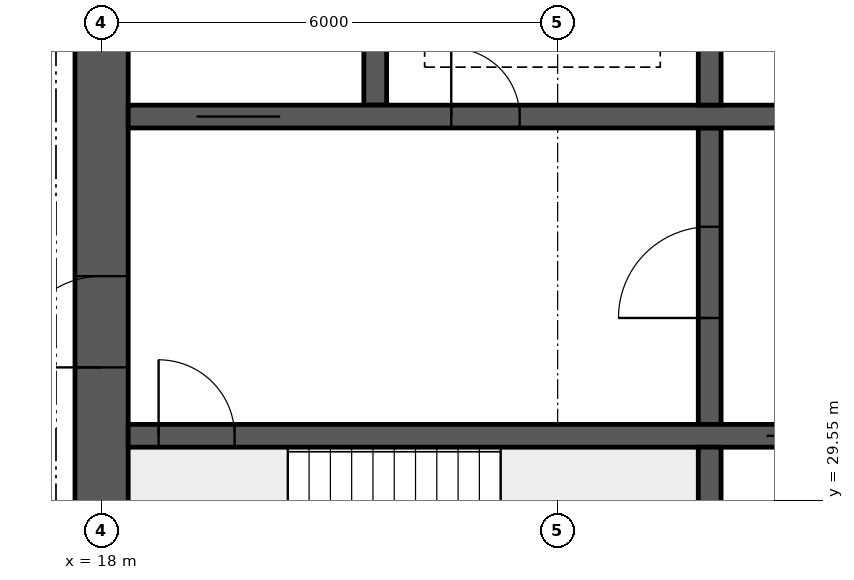
"""IFC4 building model, lengths in metres.
Left out: names, types, materials, properties, quantities, classifications, styles, units other than length and angle.
Written with IfcOpenShell. Run it as: python <this file> out.ifc"""

import sys

from ifc_helpers import new_model, si_unit, direction, frame, frame_2d, origin, place, context, subcontext, project, spatial, rectangle, extrude, element, fill, save


model = new_model("IFC4")
c1 = context("Model", 3, precision=1e-05, world=origin(), true_north=direction((0.0, 1.0)))
c2 = subcontext(c1, "Body", "Model", "MODEL_VIEW")
j1 = project(units=[si_unit("LENGTHUNIT", "METRE"), si_unit("PLANEANGLEUNIT", "RADIAN")], contexts=[c1])
p1 = place(None, origin())
s1 = spatial("IfcSite", under=j1, at=p1, CompositionType="ELEMENT")
p2 = place(p1, origin())
s2 = spatial("IfcBuilding", under=s1, at=p2, CompositionType="ELEMENT")
p3 = place(p2, frame((0.0, 0.0, 246.55)))
s3 = spatial("IfcBuildingStorey", under=s2, at=p3, CompositionType="ELEMENT", Elevation=246.55)
p4 = place(p3, frame((18.0, 26.15, 0.0), z_axis=(0.0, 0.0, 1.0), x_axis=(0.0, 1.0, 0.0)))
e1 = element("IfcWall", 1, at=p4, inside=s3, PredefinedType="SHEAR", context=c2, shape_type="SweptSolid", body=[
    extrude(rectangle(XDim=11.7, YDim=0.7, at=frame_2d((5.85, 0.0))), origin(), (0.0, 0.0, 1.0), 3.75),
])
p5 = place(p4, frame((5.15, 0.0, 0.0)))
e2 = element("IfcOpeningElement", 2, at=p5, cuts=e1, PredefinedType="OPENING", context=c2, shape_type="SweptSolid", body=[
    extrude(rectangle(XDim=1.2, YDim=2.1, at=frame_2d((0.6, 1.05))), frame((0.0, 0.36, 0.0), z_axis=(0.0, -1.0, 0.0), x_axis=(1.0, 0.0, 0.0)), (0.0, 0.0, 1.0), 0.72),
])
p6 = place(p3, frame((18.35, 30.4, 0.0), z_axis=(0.0, 0.0, 1.0), x_axis=(1.0, 0.0, 0.0)))
e3 = element("IfcWall", 3, at=p6, inside=s3, PredefinedType="SHEAR", context=c2, shape_type="SweptSolid", body=[
    extrude(rectangle(XDim=47.3, YDim=0.3, at=frame_2d((23.65, 0.0))), origin(), (0.0, 0.0, 1.0), 3.75),
])
p7 = place(p6, frame((0.4, 0.0, 0.0)))
e4 = element("IfcOpeningElement", 4, at=p7, cuts=e3, PredefinedType="OPENING", context=c2, shape_type="SweptSolid", body=[
    extrude(rectangle(XDim=1.0, YDim=2.1, at=frame_2d((0.5, 1.05))), frame((0.0, 0.16, 0.0), z_axis=(0.0, -1.0, 0.0), x_axis=(1.0, 0.0, 0.0)), (0.0, 0.0, 1.0), 0.32),
])
p8 = place(p6, frame((45.9, 0.0, 0.0)))
e5 = element("IfcOpeningElement", 5, at=p8, cuts=e3, PredefinedType="OPENING", context=c2, shape_type="SweptSolid", body=[
    extrude(rectangle(XDim=1.0, YDim=2.1, at=frame_2d((0.5, 1.05))), frame((0.0, 0.16, 0.0), z_axis=(0.0, -1.0, 0.0), x_axis=(1.0, 0.0, 0.0)), (0.0, 0.0, 1.0), 0.32),
])
p9 = place(p6, frame((8.4, 0.0, 0.0)))
e6 = element("IfcOpeningElement", 6, at=p9, cuts=e3, PredefinedType="OPENING", context=c2, shape_type="SweptSolid", body=[
    extrude(rectangle(XDim=1.1, YDim=2.1, at=frame_2d((0.55, 1.05))), frame((0.0, 0.16, 0.0), z_axis=(0.0, -1.0, 0.0), x_axis=(1.0, 0.0, 0.0)), (0.0, 0.0, 1.0), 0.32),
])
p10 = place(p6, frame((11.0, 0.0, 0.0)))
e7 = element("IfcOpeningElement", 7, at=p10, cuts=e3, PredefinedType="OPENING", context=c2, shape_type="SweptSolid", body=[
    extrude(rectangle(XDim=1.1, YDim=2.1, at=frame_2d((0.55, 1.05))), frame((0.0, 0.16, 0.0), z_axis=(0.0, -1.0, 0.0), x_axis=(1.0, 0.0, 0.0)), (0.0, 0.0, 1.0), 0.32),
])
p11 = place(p6, frame((13.6, 0.0, 0.0)))
e8 = element("IfcOpeningElement", 8, at=p11, cuts=e3, PredefinedType="OPENING", context=c2, shape_type="SweptSolid", body=[
    extrude(rectangle(XDim=1.1, YDim=2.1, at=frame_2d((0.55, 1.05))), frame((0.0, 0.16, 0.0), z_axis=(0.0, -1.0, 0.0), x_axis=(1.0, 0.0, 0.0)), (0.0, 0.0, 1.0), 0.32),
])
p12 = place(p6, frame((16.2, 0.0, 0.0)))
e9 = element("IfcOpeningElement", 9, at=p12, cuts=e3, PredefinedType="OPENING", context=c2, shape_type="SweptSolid", body=[
    extrude(rectangle(XDim=1.1, YDim=2.1, at=frame_2d((0.55, 1.05))), frame((0.0, 0.16, 0.0), z_axis=(0.0, -1.0, 0.0), x_axis=(1.0, 0.0, 0.0)), (0.0, 0.0, 1.0), 0.32),
])
p13 = place(p6, frame((18.975, 0.0, 0.0)))
e10 = element("IfcOpeningElement", 10, at=p13, cuts=e3, PredefinedType="OPENING", context=c2, shape_type="SweptSolid", body=[
    extrude(rectangle(XDim=0.9, YDim=2.1, at=frame_2d((0.45, 1.05))), frame((0.0, 0.16, 0.0), z_axis=(0.0, -1.0, 0.0), x_axis=(1.0, 0.0, 0.0)), (0.0, 0.0, 1.0), 0.32),
])
p14 = place(p6, frame((24.475, 0.0, 0.0)))
e11 = element("IfcOpeningElement", 11, at=p14, cuts=e3, PredefinedType="OPENING", context=c2, shape_type="SweptSolid", body=[
    extrude(rectangle(XDim=0.9, YDim=2.1, at=frame_2d((0.45, 1.05))), frame((0.0, 0.16, 0.0), z_axis=(0.0, -1.0, 0.0), x_axis=(1.0, 0.0, 0.0)), (0.0, 0.0, 1.0), 0.32),
])
p15 = place(p6, frame((30.267, 0.0, 0.0)))
e12 = element("IfcOpeningElement", 12, at=p15, cuts=e3, PredefinedType="OPENING", context=c2, shape_type="SweptSolid", body=[
    extrude(rectangle(XDim=1.1, YDim=2.1, at=frame_2d((0.55, 1.05))), frame((0.0, 0.16, 0.0), z_axis=(0.0, -1.0, 0.0), x_axis=(1.0, 0.0, 0.0)), (0.0, 0.0, 1.0), 0.32),
])
p16 = place(p6, frame((33.8, 0.0, 0.0)))
e13 = element("IfcOpeningElement", 13, at=p16, cuts=e3, PredefinedType="OPENING", context=c2, shape_type="SweptSolid", body=[
    extrude(rectangle(XDim=1.1, YDim=2.1, at=frame_2d((0.55, 1.05))), frame((0.0, 0.16, 0.0), z_axis=(0.0, -1.0, 0.0), x_axis=(1.0, 0.0, 0.0)), (0.0, 0.0, 1.0), 0.32),
])
p17 = place(p6, frame((37.333, 0.0, 0.0)))
e14 = element("IfcOpeningElement", 14, at=p17, cuts=e3, PredefinedType="OPENING", context=c2, shape_type="SweptSolid", body=[
    extrude(rectangle(XDim=1.1, YDim=2.1, at=frame_2d((0.55, 1.05))), frame((0.0, 0.16, 0.0), z_axis=(0.0, -1.0, 0.0), x_axis=(1.0, 0.0, 0.0)), (0.0, 0.0, 1.0), 0.32),
])
p18 = place(p3, frame((18.35, 34.6, 0.0), z_axis=(0.0, 0.0, 1.0), x_axis=(1.0, 0.0, 0.0)))
e15 = element("IfcWall", 15, at=p18, inside=s3, PredefinedType="SHEAR", context=c2, shape_type="SweptSolid", body=[
    extrude(rectangle(XDim=47.3, YDim=0.3, at=frame_2d((23.65, 0.0))), origin(), (0.0, 0.0, 1.0), 3.75),
])
p19 = place(p18, frame((0.9, 0.0, 0.0)))
e16 = element("IfcOpeningElement", 16, at=p19, cuts=e15, PredefinedType="OPENING", context=c2, shape_type="SweptSolid", body=[
    extrude(rectangle(XDim=1.1, YDim=2.1, at=frame_2d((0.55, 1.05))), frame((0.0, 0.16, 0.0), z_axis=(0.0, -1.0, 0.0), x_axis=(1.0, 0.0, 0.0)), (0.0, 0.0, 1.0), 0.32),
])
p20 = place(p18, frame((45.3, 0.0, 0.0)))
e17 = element("IfcOpeningElement", 17, at=p20, cuts=e15, PredefinedType="OPENING", context=c2, shape_type="SweptSolid", body=[
    extrude(rectangle(XDim=1.1, YDim=2.1, at=frame_2d((0.55, 1.05))), frame((0.0, 0.16, 0.0), z_axis=(0.0, -1.0, 0.0), x_axis=(1.0, 0.0, 0.0)), (0.0, 0.0, 1.0), 0.32),
])
p21 = place(p18, frame((4.25, 0.0, 0.0)))
e18 = element("IfcOpeningElement", 18, at=p21, cuts=e15, PredefinedType="OPENING", context=c2, shape_type="SweptSolid", body=[
    extrude(rectangle(XDim=0.9, YDim=2.1, at=frame_2d((0.45, 1.05))), frame((0.0, 0.16, 0.0), z_axis=(0.0, -1.0, 0.0), x_axis=(1.0, 0.0, 0.0)), (0.0, 0.0, 1.0), 0.32),
])
p22 = place(p18, frame((42.15, 0.0, 0.0)))
e19 = element("IfcOpeningElement", 19, at=p22, cuts=e15, PredefinedType="OPENING", context=c2, shape_type="SweptSolid", body=[
    extrude(rectangle(XDim=0.9, YDim=2.1, at=frame_2d((0.45, 1.05))), frame((0.0, 0.16, 0.0), z_axis=(0.0, -1.0, 0.0), x_axis=(1.0, 0.0, 0.0)), (0.0, 0.0, 1.0), 0.32),
])
p23 = place(p18, frame((9.025, 0.0, 0.0)))
e20 = element("IfcOpeningElement", 20, at=p23, cuts=e15, PredefinedType="OPENING", context=c2, shape_type="SweptSolid", body=[
    extrude(rectangle(XDim=0.9, YDim=2.1, at=frame_2d((0.45, 1.05))), frame((0.0, 0.16, 0.0), z_axis=(0.0, -1.0, 0.0), x_axis=(1.0, 0.0, 0.0)), (0.0, 0.0, 1.0), 0.32),
])
p24 = place(p18, frame((12.999, 0.0, 0.0)))
e21 = element("IfcOpeningElement", 21, at=p24, cuts=e15, PredefinedType="OPENING", context=c2, shape_type="SweptSolid", body=[
    extrude(rectangle(XDim=0.9, YDim=2.1, at=frame_2d((0.45, 1.05))), frame((0.0, 0.16, 0.0), z_axis=(0.0, -1.0, 0.0), x_axis=(1.0, 0.0, 0.0)), (0.0, 0.0, 1.0), 0.32),
])
p25 = place(p18, frame((16.646, 0.0, 0.0)))
e22 = element("IfcOpeningElement", 22, at=p25, cuts=e15, PredefinedType="OPENING", context=c2, shape_type="SweptSolid", body=[
    extrude(rectangle(XDim=0.9, YDim=2.1, at=frame_2d((0.45, 1.05))), frame((0.0, 0.16, 0.0), z_axis=(0.0, -1.0, 0.0), x_axis=(1.0, 0.0, 0.0)), (0.0, 0.0, 1.0), 0.32),
])
p26 = place(p18, frame((20.405, 0.0, 0.0)))
e23 = element("IfcOpeningElement", 23, at=p26, cuts=e15, PredefinedType="OPENING", context=c2, shape_type="SweptSolid", body=[
    extrude(rectangle(XDim=0.9, YDim=2.1, at=frame_2d((0.45, 1.05))), frame((0.0, 0.16, 0.0), z_axis=(0.0, -1.0, 0.0), x_axis=(1.0, 0.0, 0.0)), (0.0, 0.0, 1.0), 0.32),
])
p27 = place(p18, frame((24.811, 0.0, 0.0)))
e24 = element("IfcOpeningElement", 24, at=p27, cuts=e15, PredefinedType="OPENING", context=c2, shape_type="SweptSolid", body=[
    extrude(rectangle(XDim=0.9, YDim=2.1, at=frame_2d((0.45, 1.05))), frame((0.0, 0.16, 0.0), z_axis=(0.0, -1.0, 0.0), x_axis=(1.0, 0.0, 0.0)), (0.0, 0.0, 1.0), 0.32),
])
p28 = place(p18, frame((27.608, 0.0, 0.0)))
e25 = element("IfcOpeningElement", 25, at=p28, cuts=e15, PredefinedType="OPENING", context=c2, shape_type="SweptSolid", body=[
    extrude(rectangle(XDim=0.9, YDim=2.1, at=frame_2d((0.45, 1.05))), frame((0.0, 0.16, 0.0), z_axis=(0.0, -1.0, 0.0), x_axis=(1.0, 0.0, 0.0)), (0.0, 0.0, 1.0), 0.32),
])
p29 = place(p18, frame((29.778, 0.0, 0.0)))
e26 = element("IfcOpeningElement", 26, at=p29, cuts=e15, PredefinedType="OPENING", context=c2, shape_type="SweptSolid", body=[
    extrude(rectangle(XDim=0.9, YDim=2.1, at=frame_2d((0.45, 1.05))), frame((0.0, 0.16, 0.0), z_axis=(0.0, -1.0, 0.0), x_axis=(1.0, 0.0, 0.0)), (0.0, 0.0, 1.0), 0.32),
])
p30 = place(p18, frame((33.577, 0.0, 0.0)))
e27 = element("IfcOpeningElement", 27, at=p30, cuts=e15, PredefinedType="OPENING", context=c2, shape_type="SweptSolid", body=[
    extrude(rectangle(XDim=0.9, YDim=2.1, at=frame_2d((0.45, 1.05))), frame((0.0, 0.16, 0.0), z_axis=(0.0, -1.0, 0.0), x_axis=(1.0, 0.0, 0.0)), (0.0, 0.0, 1.0), 0.32),
])
p31 = place(p18, frame((37.528, 0.0, 0.0)))
e28 = element("IfcOpeningElement", 28, at=p31, cuts=e15, PredefinedType="OPENING", context=c2, shape_type="SweptSolid", body=[
    extrude(rectangle(XDim=0.9, YDim=2.1, at=frame_2d((0.45, 1.05))), frame((0.0, 0.16, 0.0), z_axis=(0.0, -1.0, 0.0), x_axis=(1.0, 0.0, 0.0)), (0.0, 0.0, 1.0), 0.32),
])
p32 = place(p3, frame((26.0, 26.15, 0.0), z_axis=(0.0, 0.0, 1.0), x_axis=(0.0, 1.0, 0.0)))
e29 = element("IfcWall", 29, at=p32, inside=s3, PredefinedType="SHEAR", context=c2, shape_type="SweptSolid", body=[
    extrude(rectangle(XDim=4.1, YDim=0.3, at=frame_2d((2.05, 0.0))), origin(), (0.0, 0.0, 1.0), 3.75),
])
p33 = place(p3, frame((26.0, 30.55, 0.0), z_axis=(0.0, 0.0, 1.0), x_axis=(0.0, 1.0, 0.0)))
e30 = element("IfcWall", 30, at=p33, inside=s3, PredefinedType="SHEAR", context=c2, shape_type="SweptSolid", body=[
    extrude(rectangle(XDim=3.9, YDim=0.3, at=frame_2d((1.95, 0.0))), origin(), (0.0, 0.0, 1.0), 3.75),
])
p34 = place(p33, frame((1.4, 0.0, 0.0)))
e31 = element("IfcOpeningElement", 31, at=p34, cuts=e30, PredefinedType="OPENING", context=c2, shape_type="SweptSolid", body=[
    extrude(rectangle(XDim=1.2, YDim=2.1, at=frame_2d((0.6, 1.05))), frame((0.0, 0.16, 0.0), z_axis=(0.0, -1.0, 0.0), x_axis=(1.0, 0.0, 0.0)), (0.0, 0.0, 1.0), 0.32),
])
for number, where, z_axis, x_axis in (
    (32, (21.6, 34.75, 0.0), (0.0, 0.0, 1.0), (0.0, 1.0, 0.0)),
    (33, (26.0, 34.75, 0.0), (0.0, 0.0, 1.0), (0.0, 1.0, 0.0)),
):
    element("IfcWall", number, at=place(p3, frame(where, z_axis=z_axis, x_axis=x_axis)), inside=s3, PredefinedType="SHEAR", context=c2, shape_type="SweptSolid", body=[
        extrude(rectangle(XDim=3.1, YDim=0.3, at=frame_2d((1.55, 0.0))), origin(), (0.0, 0.0, 1.0), 3.75),
    ])
p35 = place(p5, origin())
e34 = element("IfcDoor", 34, at=p35, inside=s3, OperationType="SINGLE_SWING_LEFT", PredefinedType="DOOR", context=c2, shape_type="SweptSolid", body=[
    extrude(rectangle(XDim=1.2, YDim=2.1, at=frame_2d((0.6, 1.05))), frame((0.0, 0.025, 0.0), z_axis=(0.0, -1.0, 0.0), x_axis=(1.0, 0.0, 0.0)), (0.0, 0.0, 1.0), 0.05),
])
fill(e2, e34)
p36 = place(p7, origin())
e35 = element("IfcDoor", 35, at=p36, inside=s3, OperationType="SINGLE_SWING_LEFT", PredefinedType="DOOR", context=c2, shape_type="SweptSolid", body=[
    extrude(rectangle(XDim=1.0, YDim=2.1, at=frame_2d((0.5, 1.05))), frame((0.0, 0.025, 0.0), z_axis=(0.0, -1.0, 0.0), x_axis=(1.0, 0.0, 0.0)), (0.0, 0.0, 1.0), 0.05),
])
fill(e4, e35)
p37 = place(p19, origin())
e36 = element("IfcDoor", 36, at=p37, inside=s3, OperationType="DOUBLE_DOOR_SLIDING", PredefinedType="DOOR", context=c2, shape_type="SweptSolid", body=[
    extrude(rectangle(XDim=1.1, YDim=2.1, at=frame_2d((0.55, 1.05))), frame((0.0, 0.025, 0.0), z_axis=(0.0, -1.0, 0.0), x_axis=(1.0, 0.0, 0.0)), (0.0, 0.0, 1.0), 0.05),
])
fill(e16, e36)
p38 = place(p21, origin())
e37 = element("IfcDoor", 37, at=p38, inside=s3, OperationType="SINGLE_SWING_LEFT", PredefinedType="DOOR", context=c2, shape_type="SweptSolid", body=[
    extrude(rectangle(XDim=0.9, YDim=2.1, at=frame_2d((0.45, 1.05))), frame((0.0, 0.025, 0.0), z_axis=(0.0, -1.0, 0.0), x_axis=(1.0, 0.0, 0.0)), (0.0, 0.0, 1.0), 0.05),
])
fill(e18, e37)
p39 = place(p34, origin())
e38 = element("IfcDoor", 38, at=p39, inside=s3, OperationType="SINGLE_SWING_LEFT", PredefinedType="DOOR", context=c2, shape_type="SweptSolid", body=[
    extrude(rectangle(XDim=1.2, YDim=2.1, at=frame_2d((0.6, 1.05))), frame((0.0, 0.025, 0.0), z_axis=(0.0, -1.0, 0.0), x_axis=(1.0, 0.0, 0.0)), (0.0, 0.0, 1.0), 0.05),
])
fill(e31, e38)
p40 = place(p9, origin())
e39 = element("IfcDoor", 39, at=p40, inside=s3, OperationType="DOUBLE_DOOR_SLIDING", PredefinedType="DOOR", context=c2, shape_type="SweptSolid", body=[
    extrude(rectangle(XDim=1.1, YDim=2.1, at=frame_2d((0.55, 1.05))), frame((0.0, 0.025, 0.0), z_axis=(0.0, -1.0, 0.0), x_axis=(1.0, 0.0, 0.0)), (0.0, 0.0, 1.0), 0.05),
])
fill(e6, e39)
save(model, sys.argv[1])
